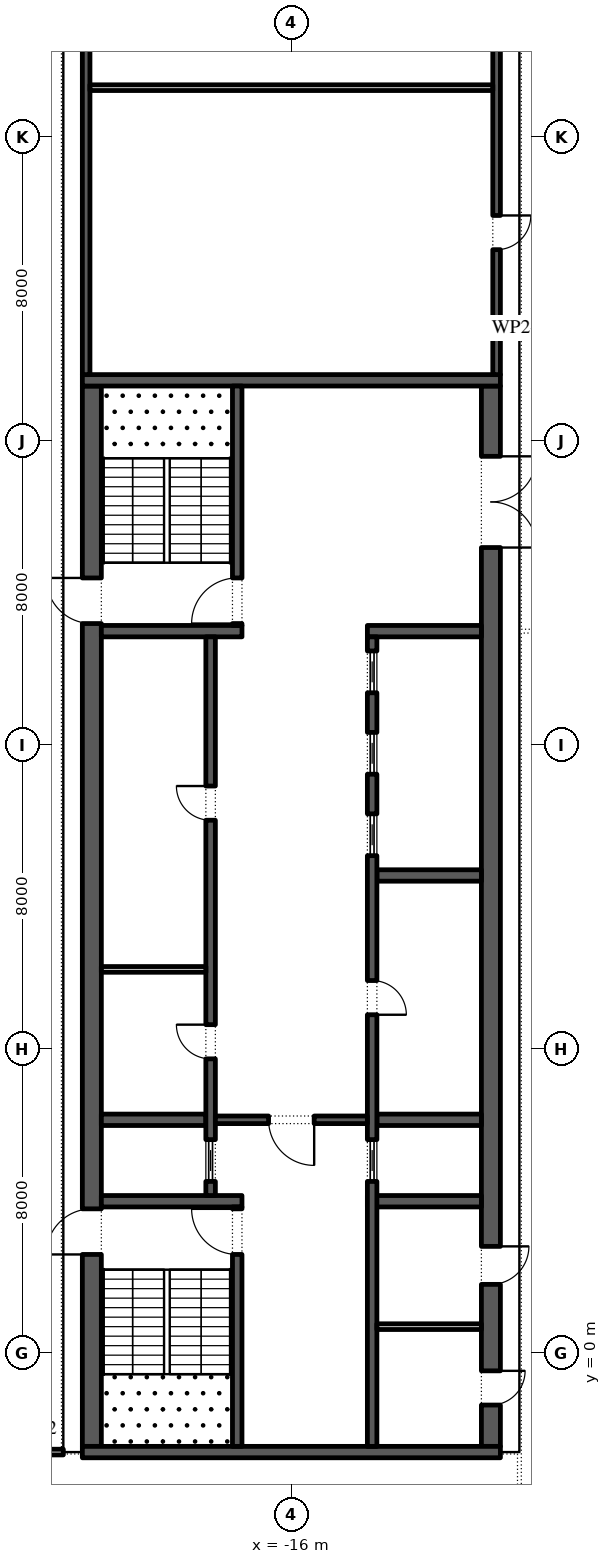
"""IFC4 building model, lengths in metres.
Left out: names, types, materials, properties, quantities, classifications, styles, units other than length and angle.
Written with IfcOpenShell. Run it as: python <this file> out.ifc"""

import sys

from ifc_helpers import new_model, si_unit, direction, frame, frame_2d, origin, place, context, subcontext, project, spatial, rectangle, extrude, element, fill, save


model = new_model("IFC4")
c1 = context("Model", 3, precision=1e-05, world=origin(), true_north=direction((0.0, 1.0)))
c2 = subcontext(c1, "Body", "Model", "MODEL_VIEW")
j1 = project(units=[si_unit("LENGTHUNIT", "METRE"), si_unit("PLANEANGLEUNIT", "RADIAN")], contexts=[c1])
p1 = place(None, origin())
s1 = spatial("IfcSite", under=j1, at=p1, CompositionType="ELEMENT")
p2 = place(p1, origin())
s2 = spatial("IfcBuilding", under=s1, at=p2, CompositionType="ELEMENT")
p3 = place(p2, frame((0.0, 0.0, 317.4)))
s3 = spatial("IfcBuildingStorey", under=s2, at=p3, CompositionType="ELEMENT", Elevation=317.4)
p4 = place(p3, frame((-21.25, -2.45, 0.0), z_axis=(0.0, 0.0, 1.0), x_axis=(0.0, 1.0, 0.0)))
e1 = element("IfcWall", 1, at=p4, inside=s3, PredefinedType="SHEAR", context=c2, shape_type="SweptSolid", body=[
    extrude(rectangle(XDim=27.9, YDim=0.5, at=frame_2d((13.95, 0.0))), origin(), (0.0, 0.0, 1.0), 4.0),
])
p5 = place(p4, frame((5.05, 0.0, 0.0)))
e2 = element("IfcOpeningElement", 2, at=p5, cuts=e1, PredefinedType="OPENING", context=c2, shape_type="SweptSolid", body=[
    extrude(rectangle(XDim=1.2, YDim=2.1, at=frame_2d((0.6, 1.05))), frame((0.0, 0.26, 0.0), z_axis=(0.0, -1.0, 0.0), x_axis=(1.0, 0.0, 0.0)), (0.0, 0.0, 1.0), 0.52),
])
p6 = place(p4, frame((21.65, 0.0, 0.0)))
e3 = element("IfcOpeningElement", 3, at=p6, cuts=e1, PredefinedType="OPENING", context=c2, shape_type="SweptSolid", body=[
    extrude(rectangle(XDim=1.2, YDim=2.1, at=frame_2d((0.6, 1.05))), frame((0.0, 0.26, 0.0), z_axis=(0.0, -1.0, 0.0), x_axis=(1.0, 0.0, 0.0)), (0.0, 0.0, 1.0), 0.52),
])
p7 = place(p3, frame((-10.75, -2.45, 0.0), z_axis=(0.0, 0.0, 1.0), x_axis=(0.0, 1.0, 0.0)))
e4 = element("IfcWall", 4, at=p7, inside=s3, PredefinedType="SHEAR", context=c2, shape_type="SweptSolid", body=[
    extrude(rectangle(XDim=27.9, YDim=0.5, at=frame_2d((13.95, 0.0))), origin(), (0.0, 0.0, 1.0), 4.0),
])
p8 = place(p7, frame((23.65, 0.0, 0.0)))
e5 = element("IfcOpeningElement", 5, at=p8, cuts=e4, PredefinedType="OPENING", context=c2, shape_type="SweptSolid", body=[
    extrude(rectangle(XDim=2.4, YDim=2.1, at=frame_2d((1.2, 1.05))), frame((0.0, 0.26, 0.0), z_axis=(0.0, -1.0, 0.0), x_axis=(1.0, 0.0, 0.0)), (0.0, 0.0, 1.0), 0.52),
])
p9 = place(p7, frame((1.087, 0.0, 0.0)))
e6 = element("IfcOpeningElement", 6, at=p9, cuts=e4, PredefinedType="OPENING", context=c2, shape_type="SweptSolid", body=[
    extrude(rectangle(XDim=0.9, YDim=2.1, at=frame_2d((0.45, 1.05))), frame((0.0, 0.26, 0.0), z_axis=(0.0, -1.0, 0.0), x_axis=(1.0, 0.0, 0.0)), (0.0, 0.0, 1.0), 0.52),
])
p10 = place(p7, frame((4.262, 0.0, 0.0)))
e7 = element("IfcOpeningElement", 7, at=p10, cuts=e4, PredefinedType="OPENING", context=c2, shape_type="SweptSolid", body=[
    extrude(rectangle(XDim=1.0, YDim=2.1, at=frame_2d((0.5, 1.05))), frame((0.0, 0.26, 0.0), z_axis=(0.0, -1.0, 0.0), x_axis=(1.0, 0.0, 0.0)), (0.0, 0.0, 1.0), 0.52),
])
for number, where, z_axis, x_axis in (
    (8, (-21.5, -2.6, 0.0), (0.0, 0.0, 1.0), (1.0, 0.0, 0.0)),
    (9, (-21.5, 25.6, 0.0), (0.0, 0.0, 1.0), (1.0, 0.0, 0.0)),
):
    element("IfcWall", number, at=place(p3, frame(where, z_axis=z_axis, x_axis=x_axis)), inside=s3, PredefinedType="SHEAR", context=c2, shape_type="SweptSolid", body=[
        extrude(rectangle(XDim=11.0, YDim=0.3, at=frame_2d((5.5, 0.0))), origin(), (0.0, 0.0, 1.0), 4.0),
    ])
p11 = place(p3, frame((-21.0, 4.0, 0.0), z_axis=(0.0, 0.0, 1.0), x_axis=(1.0, 0.0, 0.0)))
e10 = element("IfcWall", 10, at=p11, inside=s3, PredefinedType="SHEAR", context=c2, shape_type="SweptSolid", body=[
    extrude(rectangle(XDim=3.7, YDim=0.3, at=frame_2d((1.85, 0.0))), origin(), (0.0, 0.0, 1.0), 4.0),
])
p12 = place(p3, frame((-17.425, -2.45, 0.0), z_axis=(0.0, 0.0, 1.0), x_axis=(0.0, 1.0, 0.0)))
e11 = element("IfcWall", 11, at=p12, inside=s3, PredefinedType="SHEAR", context=c2, shape_type="SweptSolid", body=[
    extrude(rectangle(XDim=6.3, YDim=0.25, at=frame_2d((3.15, 0.0))), origin(), (0.0, 0.0, 1.0), 4.0),
])
p13 = place(p12, frame((5.05, 0.0, 0.0)))
e12 = element("IfcOpeningElement", 12, at=p13, cuts=e11, PredefinedType="OPENING", context=c2, shape_type="SweptSolid", body=[
    extrude(rectangle(XDim=1.2, YDim=2.1, at=frame_2d((0.6, 1.05))), frame((0.0, 0.135, 0.0), z_axis=(0.0, -1.0, 0.0), x_axis=(1.0, 0.0, 0.0)), (0.0, 0.0, 1.0), 0.27),
])
p14 = place(p3, frame((-21.0, 19.0, 0.0), z_axis=(0.0, 0.0, 1.0), x_axis=(1.0, 0.0, 0.0)))
e13 = element("IfcWall", 13, at=p14, inside=s3, PredefinedType="SHEAR", context=c2, shape_type="SweptSolid", body=[
    extrude(rectangle(XDim=3.7, YDim=0.3, at=frame_2d((1.85, 0.0))), origin(), (0.0, 0.0, 1.0), 4.0),
])
p15 = place(p3, frame((-17.425, 19.15, 0.0), z_axis=(0.0, 0.0, 1.0), x_axis=(0.0, 1.0, 0.0)))
e14 = element("IfcWall", 14, at=p15, inside=s3, PredefinedType="SHEAR", context=c2, shape_type="SweptSolid", body=[
    extrude(rectangle(XDim=6.3, YDim=0.25, at=frame_2d((3.15, 0.0))), origin(), (0.0, 0.0, 1.0), 4.0),
])
p16 = place(p15, frame((0.05, 0.0, 0.0)))
e15 = element("IfcOpeningElement", 15, at=p16, cuts=e14, PredefinedType="OPENING", context=c2, shape_type="SweptSolid", body=[
    extrude(rectangle(XDim=1.2, YDim=2.1, at=frame_2d((0.6, 1.05))), frame((0.0, 0.135, 0.0), z_axis=(0.0, -1.0, 0.0), x_axis=(1.0, 0.0, 0.0)), (0.0, 0.0, 1.0), 0.27),
])
p17 = place(p3, frame((-21.0, 6.143, 0.0), z_axis=(0.0, 0.0, 1.0), x_axis=(1.0, 0.0, 0.0)))
e16 = element("IfcWall", 16, at=p17, inside=s3, PredefinedType="SHEAR", context=c2, shape_type="SweptSolid", body=[
    extrude(rectangle(XDim=2.75, YDim=0.3, at=frame_2d((1.375, 0.0))), origin(), (0.0, 0.0, 1.0), 4.0),
])
p18 = place(p3, frame((-18.125, 4.15, 0.0), z_axis=(0.0, 0.0, 1.0), x_axis=(0.0, 1.0, 0.0)))
e17 = element("IfcWall", 17, at=p18, inside=s3, PredefinedType="SHEAR", context=c2, shape_type="SweptSolid", body=[
    extrude(rectangle(XDim=14.7, YDim=0.25, at=frame_2d((7.35, 0.0))), origin(), (0.0, 0.0, 1.0), 4.0),
])
p19 = place(p18, frame((3.596, 0.0, 0.0)))
e18 = element("IfcOpeningElement", 18, at=p19, cuts=e17, PredefinedType="OPENING", context=c2, shape_type="SweptSolid", body=[
    extrude(rectangle(XDim=0.9, YDim=2.1, at=frame_2d((0.45, 1.05))), frame((0.0, 0.135, 0.0), z_axis=(0.0, -1.0, 0.0), x_axis=(1.0, 0.0, 0.0)), (0.0, 0.0, 1.0), 0.27),
])
p20 = place(p18, frame((9.875, 0.0, 0.0)))
e19 = element("IfcOpeningElement", 19, at=p20, cuts=e17, PredefinedType="OPENING", context=c2, shape_type="SweptSolid", body=[
    extrude(rectangle(XDim=0.9, YDim=2.1, at=frame_2d((0.45, 1.05))), frame((0.0, 0.135, 0.0), z_axis=(0.0, -1.0, 0.0), x_axis=(1.0, 0.0, 0.0)), (0.0, 0.0, 1.0), 0.27),
])
p21 = place(p18, frame((0.371, 0.0, 0.0)))
e20 = element("IfcOpeningElement", 20, at=p21, cuts=e17, PredefinedType="OPENING", context=c2, shape_type="SweptSolid", body=[
    extrude(rectangle(XDim=1.1, YDim=2.1, at=frame_2d((0.55, 1.05))), frame((0.0, 0.135, 0.0), z_axis=(0.0, -1.0, 0.0), x_axis=(1.0, 0.0, 0.0)), (0.0, 0.0, 1.0), 0.27),
])
p22 = place(p3, frame((-21.0, 10.1, 0.0), z_axis=(0.0, 0.0, 1.0), x_axis=(1.0, 0.0, 0.0)))
e21 = element("IfcWall", 21, at=p22, inside=s3, PredefinedType="PARTITIONING", context=c2, shape_type="SweptSolid", body=[
    extrude(rectangle(XDim=2.75, YDim=0.15, at=frame_2d((1.375, 0.0))), origin(), (0.0, 0.0, 1.0), 4.0),
])
p23 = place(p3, frame((-14.0, 4.0, 0.0), z_axis=(0.0, 0.0, 1.0), x_axis=(1.0, 0.0, 0.0)))
e22 = element("IfcWall", 22, at=p23, inside=s3, PredefinedType="SHEAR", context=c2, shape_type="SweptSolid", body=[
    extrude(rectangle(XDim=3.0, YDim=0.3, at=frame_2d((1.5, 0.0))), origin(), (0.0, 0.0, 1.0), 4.0),
])
for number, where, z_axis, x_axis in (
    (23, (-13.75, 6.143, 0.0), (0.0, 0.0, 1.0), (1.0, 0.0, 0.0)),
    (24, (-13.75, 12.571, 0.0), (0.0, 0.0, 1.0), (1.0, 0.0, 0.0)),
):
    element("IfcWall", number, at=place(p3, frame(where, z_axis=z_axis, x_axis=x_axis)), inside=s3, PredefinedType="SHEAR", context=c2, shape_type="SweptSolid", body=[
        extrude(rectangle(XDim=2.75, YDim=0.3, at=frame_2d((1.375, 0.0))), origin(), (0.0, 0.0, 1.0), 4.0),
    ])
p24 = place(p3, frame((-14.0, 19.0, 0.0), z_axis=(0.0, 0.0, 1.0), x_axis=(1.0, 0.0, 0.0)))
e25 = element("IfcWall", 25, at=p24, inside=s3, PredefinedType="SHEAR", context=c2, shape_type="SweptSolid", body=[
    extrude(rectangle(XDim=3.0, YDim=0.3, at=frame_2d((1.5, 0.0))), origin(), (0.0, 0.0, 1.0), 4.0),
])
p25 = place(p3, frame((-13.875, -2.45, 0.0), z_axis=(0.0, 0.0, 1.0), x_axis=(0.0, 1.0, 0.0)))
e26 = element("IfcWall", 26, at=p25, inside=s3, PredefinedType="SHEAR", context=c2, shape_type="SweptSolid", body=[
    extrude(rectangle(XDim=21.3, YDim=0.25, at=frame_2d((10.65, 0.0))), origin(), (0.0, 0.0, 1.0), 4.0),
])
p26 = place(p25, frame((11.357, 0.0, 0.0)))
e27 = element("IfcOpeningElement", 27, at=p26, cuts=e26, PredefinedType="OPENING", context=c2, shape_type="SweptSolid", body=[
    extrude(rectangle(XDim=0.9, YDim=2.1, at=frame_2d((0.45, 1.05))), frame((0.0, 0.135, 0.0), z_axis=(0.0, -1.0, 0.0), x_axis=(1.0, 0.0, 0.0)), (0.0, 0.0, 1.0), 0.27),
])
p27 = place(p25, frame((6.971, 0.0, 0.0)))
e28 = element("IfcOpeningElement", 28, at=p27, cuts=e26, PredefinedType="OPENING", context=c2, shape_type="SweptSolid", body=[
    extrude(rectangle(XDim=1.1, YDim=2.1, at=frame_2d((0.55, 1.05))), frame((0.0, 0.135, 0.0), z_axis=(0.0, -1.0, 0.0), x_axis=(1.0, 0.0, 0.0)), (0.0, 0.0, 1.0), 0.27),
])
p28 = place(p25, frame((15.543, 0.0, 0.0)))
e29 = element("IfcOpeningElement", 29, at=p28, cuts=e26, PredefinedType="OPENING", context=c2, shape_type="SweptSolid", body=[
    extrude(rectangle(XDim=1.1, YDim=2.1, at=frame_2d((0.55, 1.05))), frame((0.0, 0.135, 0.0), z_axis=(0.0, -1.0, 0.0), x_axis=(1.0, 0.0, 0.0)), (0.0, 0.0, 1.0), 0.27),
])
p29 = place(p25, frame((17.686, 0.0, 0.0)))
e30 = element("IfcOpeningElement", 30, at=p29, cuts=e26, PredefinedType="OPENING", context=c2, shape_type="SweptSolid", body=[
    extrude(rectangle(XDim=1.1, YDim=2.1, at=frame_2d((0.55, 1.05))), frame((0.0, 0.135, 0.0), z_axis=(0.0, -1.0, 0.0), x_axis=(1.0, 0.0, 0.0)), (0.0, 0.0, 1.0), 0.27),
])
p30 = place(p25, frame((19.829, 0.0, 0.0)))
e31 = element("IfcOpeningElement", 31, at=p30, cuts=e26, PredefinedType="OPENING", context=c2, shape_type="SweptSolid", body=[
    extrude(rectangle(XDim=1.1, YDim=2.1, at=frame_2d((0.55, 1.05))), frame((0.0, 0.135, 0.0), z_axis=(0.0, -1.0, 0.0), x_axis=(1.0, 0.0, 0.0)), (0.0, 0.0, 1.0), 0.27),
])
p31 = place(p3, frame((-18.0, 6.143, 0.0), z_axis=(0.0, 0.0, 1.0), x_axis=(1.0, 0.0, 0.0)))
e32 = element("IfcWall", 32, at=p31, inside=s3, PredefinedType="SHEAR", context=c2, shape_type="SweptSolid", body=[
    extrude(rectangle(XDim=4.0, YDim=0.2, at=frame_2d((2.0, 0.0))), origin(), (0.0, 0.0, 1.0), 4.0),
])
p32 = place(p31, frame((1.4, 0.0, 0.0)))
e33 = element("IfcOpeningElement", 33, at=p32, cuts=e32, PredefinedType="OPENING", context=c2, shape_type="SweptSolid", body=[
    extrude(rectangle(XDim=1.2, YDim=2.1, at=frame_2d((0.6, 1.05))), frame((0.0, 0.11, 0.0), z_axis=(0.0, -1.0, 0.0), x_axis=(1.0, 0.0, 0.0)), (0.0, 0.0, 1.0), 0.22),
])
p33 = place(p3, frame((-13.75, 0.7, 0.0), z_axis=(0.0, 0.0, 1.0), x_axis=(1.0, 0.0, 0.0)))
e34 = element("IfcWall", 34, at=p33, inside=s3, PredefinedType="PARTITIONING", context=c2, shape_type="SweptSolid", body=[
    extrude(rectangle(XDim=2.75, YDim=0.15, at=frame_2d((1.375, 0.0))), origin(), (0.0, 0.0, 1.0), 4.0),
])
p34 = place(p3, frame((-21.4, 25.75, 0.0), z_axis=(0.0, 0.0, 1.0), x_axis=(0.0, 1.0, 0.0)))
e35 = element("IfcWall", 35, at=p34, inside=s3, PredefinedType="SHEAR", context=c2, shape_type="SweptSolid", body=[
    extrude(rectangle(XDim=15.05, YDim=0.2, at=frame_2d((7.525, 0.0))), origin(), (0.0, 0.0, 1.0), 4.0),
])
p35 = place(p3, frame((-10.6, 25.75, 0.0), z_axis=(0.0, 0.0, 1.0), x_axis=(0.0, 1.0, 0.0)))
e36 = element("IfcWall", 36, at=p35, inside=s3, PredefinedType="SHEAR", context=c2, shape_type="SweptSolid", body=[
    extrude(rectangle(XDim=15.05, YDim=0.2, at=frame_2d((7.525, 0.0))), origin(), (0.0, 0.0, 1.0), 4.0),
])
p36 = place(p35, frame((3.288, 0.0, 0.0)))
e37 = element("IfcOpeningElement", 37, at=p36, cuts=e36, PredefinedType="OPENING", context=c2, shape_type="SweptSolid", body=[
    extrude(rectangle(XDim=0.9, YDim=2.1, at=frame_2d((0.45, 1.05))), frame((0.0, 0.11, 0.0), z_axis=(0.0, -1.0, 0.0), x_axis=(1.0, 0.0, 0.0)), (0.0, 0.0, 1.0), 0.22),
])
p37 = place(p35, frame((10.887, 0.0, 0.0)))
e38 = element("IfcOpeningElement", 38, at=p37, cuts=e36, PredefinedType="OPENING", context=c2, shape_type="SweptSolid", body=[
    extrude(rectangle(XDim=0.9, YDim=2.1, at=frame_2d((0.45, 1.05))), frame((0.0, 0.11, 0.0), z_axis=(0.0, -1.0, 0.0), x_axis=(1.0, 0.0, 0.0)), (0.0, 0.0, 1.0), 0.22),
])
p38 = place(p3, frame((-21.3, 33.3, 0.0), z_axis=(0.0, 0.0, 1.0), x_axis=(1.0, 0.0, 0.0)))
e39 = element("IfcWall", 39, at=p38, inside=s3, PredefinedType="PARTITIONING", context=c2, shape_type="SweptSolid", body=[
    extrude(rectangle(XDim=10.6, YDim=0.15, at=frame_2d((5.3, 0.0))), origin(), (0.0, 0.0, 1.0), 4.0),
])
p39 = place(p3, frame((-24.25, -2.6, 0.0), z_axis=(0.0, 0.0, 1.0), x_axis=(1.0, 0.0, 0.0)))
e40 = element("IfcWall", 40, at=p39, inside=s3, PredefinedType="PARTITIONING", context=c2, shape_type="SweptSolid", body=[
    extrude(rectangle(XDim=2.25, YDim=0.15, at=frame_2d((1.125, 0.0))), origin(), (0.0, 0.0, 1.0), 4.0),
])
p40 = place(p19, origin())
e41 = element("IfcDoor", 41, at=p40, inside=s3, OperationType="SINGLE_SWING_LEFT", PredefinedType="DOOR", context=c2, shape_type="SweptSolid", body=[
    extrude(rectangle(XDim=0.9, YDim=2.1, at=frame_2d((0.45, 1.05))), frame((0.0, 0.125, 0.0), z_axis=(0.0, -1.0, 0.0), x_axis=(1.0, 0.0, 0.0)), (0.0, 0.0, 1.0), 0.05),
])
fill(e18, e41)
p41 = place(p20, origin())
e42 = element("IfcDoor", 42, at=p41, inside=s3, OperationType="SINGLE_SWING_LEFT", PredefinedType="DOOR", context=c2, shape_type="SweptSolid", body=[
    extrude(rectangle(XDim=0.9, YDim=2.1, at=frame_2d((0.45, 1.05))), frame((0.0, 0.125, 0.0), z_axis=(0.0, -1.0, 0.0), x_axis=(1.0, 0.0, 0.0)), (0.0, 0.0, 1.0), 0.05),
])
fill(e19, e42)
p42 = place(p21, origin())
e43 = element("IfcDoor", 43, at=p42, inside=s3, OperationType="SLIDING_TO_LEFT", PredefinedType="DOOR", context=c2, shape_type="SweptSolid", body=[
    extrude(rectangle(XDim=1.1, YDim=2.1, at=frame_2d((0.55, 1.05))), frame((0.0, 0.025, 0.0), z_axis=(0.0, -1.0, 0.0), x_axis=(1.0, 0.0, 0.0)), (0.0, 0.0, 1.0), 0.05),
])
fill(e20, e43)
p43 = place(p26, frame((0.9, -0.2, 0.0), z_axis=(0.0, 0.0, 1.0), x_axis=(-1.0, 0.0, 0.0)))
e44 = element("IfcDoor", 44, at=p43, inside=s3, OperationType="SINGLE_SWING_LEFT", PredefinedType="DOOR", context=c2, shape_type="SweptSolid", body=[
    extrude(rectangle(XDim=0.9, YDim=2.1, at=frame_2d((0.45, 1.05))), frame((0.0, -0.075, 0.0), z_axis=(0.0, -1.0, 0.0), x_axis=(1.0, 0.0, 0.0)), (0.0, 0.0, 1.0), 0.05),
])
fill(e27, e44)
p44 = place(p27, origin())
e45 = element("IfcDoor", 45, at=p44, inside=s3, OperationType="SLIDING_TO_LEFT", PredefinedType="DOOR", context=c2, shape_type="SweptSolid", body=[
    extrude(rectangle(XDim=1.1, YDim=2.1, at=frame_2d((0.55, 1.05))), frame((0.0, 0.025, 0.0), z_axis=(0.0, -1.0, 0.0), x_axis=(1.0, 0.0, 0.0)), (0.0, 0.0, 1.0), 0.05),
])
fill(e28, e45)
p45 = place(p28, origin())
e46 = element("IfcDoor", 46, at=p45, inside=s3, OperationType="SLIDING_TO_LEFT", PredefinedType="DOOR", context=c2, shape_type="SweptSolid", body=[
    extrude(rectangle(XDim=1.1, YDim=2.1, at=frame_2d((0.55, 1.05))), frame((0.0, 0.025, 0.0), z_axis=(0.0, -1.0, 0.0), x_axis=(1.0, 0.0, 0.0)), (0.0, 0.0, 1.0), 0.05),
])
fill(e29, e46)
p46 = place(p29, origin())
e47 = element("IfcDoor", 47, at=p46, inside=s3, OperationType="SLIDING_TO_LEFT", PredefinedType="DOOR", context=c2, shape_type="SweptSolid", body=[
    extrude(rectangle(XDim=1.1, YDim=2.1, at=frame_2d((0.55, 1.05))), frame((0.0, 0.025, 0.0), z_axis=(0.0, -1.0, 0.0), x_axis=(1.0, 0.0, 0.0)), (0.0, 0.0, 1.0), 0.05),
])
fill(e30, e47)
p47 = place(p30, origin())
e48 = element("IfcDoor", 48, at=p47, inside=s3, OperationType="SLIDING_TO_LEFT", PredefinedType="DOOR", context=c2, shape_type="SweptSolid", body=[
    extrude(rectangle(XDim=1.1, YDim=2.1, at=frame_2d((0.55, 1.05))), frame((0.0, 0.025, 0.0), z_axis=(0.0, -1.0, 0.0), x_axis=(1.0, 0.0, 0.0)), (0.0, 0.0, 1.0), 0.05),
])
fill(e31, e48)
p48 = place(p32, frame((1.2, 0.0, 0.0), z_axis=(0.0, 0.0, 1.0), x_axis=(-1.0, 0.0, 0.0)))
e49 = element("IfcDoor", 49, at=p48, inside=s3, OperationType="SINGLE_SWING_RIGHT", PredefinedType="DOOR", context=c2, shape_type="SweptSolid", body=[
    extrude(rectangle(XDim=1.2, YDim=2.1, at=frame_2d((0.6, 1.05))), frame((0.0, 0.025, 0.0), z_axis=(0.0, -1.0, 0.0), x_axis=(1.0, 0.0, 0.0)), (0.0, 0.0, 1.0), 0.05),
])
fill(e33, e49)
p49 = place(p8, frame((2.4, 0.0, 0.0), z_axis=(0.0, 0.0, 1.0), x_axis=(-1.0, 0.0, 0.0)))
e50 = element("IfcDoor", 50, at=p49, inside=s3, OperationType="DOUBLE_DOOR_SINGLE_SWING", PredefinedType="DOOR", context=c2, shape_type="SweptSolid", body=[
    extrude(rectangle(XDim=2.4, YDim=2.1, at=frame_2d((1.2, 1.05))), frame((0.0, 0.025, 0.0), z_axis=(0.0, -1.0, 0.0), x_axis=(1.0, 0.0, 0.0)), (0.0, 0.0, 1.0), 0.05),
])
fill(e5, e50)
p50 = place(p13, origin())
e51 = element("IfcDoor", 51, at=p50, inside=s3, OperationType="SINGLE_SWING_LEFT", PredefinedType="DOOR", context=c2, shape_type="SweptSolid", body=[
    extrude(rectangle(XDim=1.2, YDim=2.1, at=frame_2d((0.6, 1.05))), frame((0.0, 0.025, 0.0), z_axis=(0.0, -1.0, 0.0), x_axis=(1.0, 0.0, 0.0)), (0.0, 0.0, 1.0), 0.05),
])
fill(e12, e51)
p51 = place(p5, origin())
e52 = element("IfcDoor", 52, at=p51, inside=s3, OperationType="SINGLE_SWING_RIGHT", PredefinedType="DOOR", context=c2, shape_type="SweptSolid", body=[
    extrude(rectangle(XDim=1.2, YDim=2.1, at=frame_2d((0.6, 1.05))), frame((0.0, 0.025, 0.0), z_axis=(0.0, -1.0, 0.0), x_axis=(1.0, 0.0, 0.0)), (0.0, 0.0, 1.0), 0.05),
])
fill(e2, e52)
p52 = place(p16, origin())
e53 = element("IfcDoor", 53, at=p52, inside=s3, OperationType="SINGLE_SWING_RIGHT", PredefinedType="DOOR", context=c2, shape_type="SweptSolid", body=[
    extrude(rectangle(XDim=1.2, YDim=2.1, at=frame_2d((0.6, 1.05))), frame((0.0, 0.025, 0.0), z_axis=(0.0, -1.0, 0.0), x_axis=(1.0, 0.0, 0.0)), (0.0, 0.0, 1.0), 0.05),
])
fill(e15, e53)
p53 = place(p6, origin())
e54 = element("IfcDoor", 54, at=p53, inside=s3, OperationType="SINGLE_SWING_LEFT", PredefinedType="DOOR", context=c2, shape_type="SweptSolid", body=[
    extrude(rectangle(XDim=1.2, YDim=2.1, at=frame_2d((0.6, 1.05))), frame((0.0, 0.025, 0.0), z_axis=(0.0, -1.0, 0.0), x_axis=(1.0, 0.0, 0.0)), (0.0, 0.0, 1.0), 0.05),
])
fill(e3, e54)
p54 = place(p9, frame((0.9, 0.45, 0.0), z_axis=(0.0, 0.0, 1.0), x_axis=(-1.0, 0.0, 0.0)))
e55 = element("IfcDoor", 55, at=p54, inside=s3, OperationType="SINGLE_SWING_RIGHT", PredefinedType="DOOR", context=c2, shape_type="SweptSolid", body=[
    extrude(rectangle(XDim=0.9, YDim=2.1, at=frame_2d((0.45, 1.05))), frame((0.0, 0.25, 0.0), z_axis=(0.0, -1.0, 0.0), x_axis=(1.0, 0.0, 0.0)), (0.0, 0.0, 1.0), 0.05),
])
fill(e6, e55)
p55 = place(p10, frame((1.0, 0.45, 0.0), z_axis=(0.0, 0.0, 1.0), x_axis=(-1.0, 0.0, 0.0)))
e56 = element("IfcDoor", 56, at=p55, inside=s3, OperationType="SINGLE_SWING_RIGHT", PredefinedType="DOOR", context=c2, shape_type="SweptSolid", body=[
    extrude(rectangle(XDim=1.0, YDim=2.1, at=frame_2d((0.5, 1.05))), frame((0.0, 0.25, 0.0), z_axis=(0.0, -1.0, 0.0), x_axis=(1.0, 0.0, 0.0)), (0.0, 0.0, 1.0), 0.05),
])
fill(e7, e56)
p56 = place(p36, frame((0.9, 0.15, 0.0), z_axis=(0.0, 0.0, 1.0), x_axis=(-1.0, 0.0, 0.0)))
e57 = element("IfcDoor", 57, at=p56, inside=s3, OperationType="SINGLE_SWING_RIGHT", PredefinedType="DOOR", context=c2, shape_type="SweptSolid", body=[
    extrude(rectangle(XDim=0.9, YDim=2.1, at=frame_2d((0.45, 1.05))), frame((0.0, 0.1, 0.0), z_axis=(0.0, -1.0, 0.0), x_axis=(1.0, 0.0, 0.0)), (0.0, 0.0, 1.0), 0.05),
])
fill(e37, e57)
save(model, sys.argv[1])
